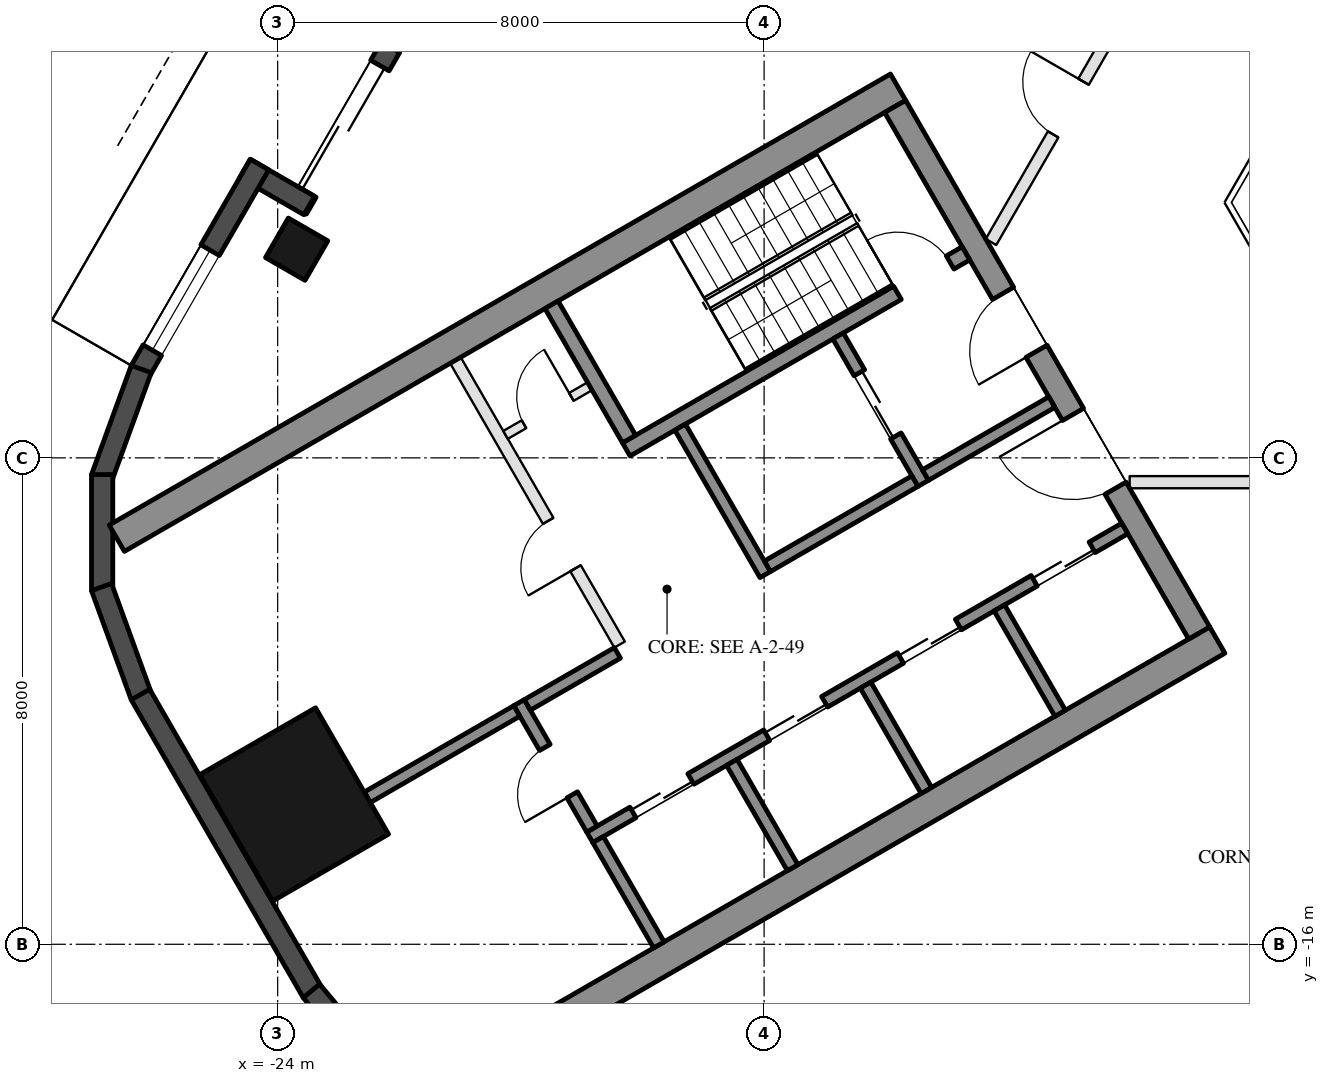
"""IFC4 building model, lengths in metres.
Left out: names, types, materials, properties, quantities, classifications, styles, units other than length and angle.
Written with IfcOpenShell. Run it as: python <this file> out.ifc"""

import sys

from ifc_helpers import new_model, si_unit, direction, frame, frame_2d, origin, origin_2d, place, context, subcontext, project, spatial, rectangle, hollow_rectangle, extrude, element, fill, save


model = new_model("IFC4")
c1 = context("Model", 3, precision=1e-05, world=origin(), true_north=direction((0.0, 1.0)))
c2 = subcontext(c1, "Body", "Model", "MODEL_VIEW")
j1 = project(units=[si_unit("LENGTHUNIT", "METRE"), si_unit("PLANEANGLEUNIT", "RADIAN")], contexts=[c1])
p1 = place(None, origin())
s1 = spatial("IfcSite", under=j1, at=p1, CompositionType="ELEMENT")
p2 = place(p1, origin())
s2 = spatial("IfcBuilding", under=s1, at=p2, CompositionType="ELEMENT")
p3 = place(p2, frame((0.0, 0.0, 213.2)))
s3 = spatial("IfcBuildingStorey", under=s2, at=p3, CompositionType="ELEMENT", Elevation=213.2)
p4 = place(p3, frame((-23.688, -4.568, 0.0), z_axis=(0.0, 0.0, 1.0), x_axis=(0.5, 0.866025403784, 0.0)))
e1 = element("IfcColumn", 1, at=p4, inside=s3, PredefinedType="COLUMN", context=c2, shape_type="SweptSolid", body=[
    extrude(hollow_rectangle(XDim=0.75, YDim=0.75, WallThickness=0.035, at=origin_2d()), origin(), (0.0, 0.0, 1.0), 3.7),
])
p5 = place(p3, frame((-23.729, -13.7, 0.0), z_axis=(0.0, 0.0, 1.0), x_axis=(-0.5, 0.866025403784, 0.0)))
e2 = element("IfcColumn", 2, at=p5, inside=s3, PredefinedType="COLUMN", context=c2, shape_type="SweptSolid", body=[
    extrude(hollow_rectangle(XDim=2.4, YDim=2.2, WallThickness=0.06, at=origin_2d()), origin(), (0.0, 0.0, 1.0), 3.7),
])
p6 = place(p3, frame((-20.309, 1.934, 0.0), z_axis=(0.0, 0.0, 1.0), x_axis=(-0.499992114976, -0.866029956157, 0.0)))
e3 = element("IfcWall", 3, at=p6, inside=s3, PredefinedType="SOLIDWALL", context=c2, shape_type="SweptSolid", body=[
    extrude(rectangle(XDim=6.74, YDim=0.35, at=frame_2d((3.37, 0.0))), origin(), (0.0, 0.0, 1.0), 3.55),
])
p7 = place(p6, frame((4.02, 0.0, 0.0)))
e4 = element("IfcOpeningElement", 4, at=p7, cuts=e3, PredefinedType="OPENING", context=c2, shape_type="SweptSolid", body=[
    extrude(rectangle(XDim=2.4, YDim=2.4, at=frame_2d((1.2, 1.2))), frame((0.0, 0.185, 0.0), z_axis=(0.0, -1.0, 0.0), x_axis=(1.0, 0.0, 0.0)), (0.0, 0.0, 1.0), 0.37),
])
p8 = place(p6, frame((0.77, 0.0, 0.3)))
e5 = element("IfcOpeningElement", 5, at=p8, cuts=e3, PredefinedType="OPENING", context=c2, shape_type="SweptSolid", body=[
    extrude(rectangle(XDim=2.9, YDim=2.65, at=frame_2d((1.45, 1.325))), frame((0.0, 0.185, 0.0), z_axis=(0.0, -1.0, 0.0), x_axis=(1.0, 0.0, 0.0)), (0.0, 0.0, 1.0), 0.37),
])
p9 = place(p3, frame((-23.481, -3.85, 0.0), z_axis=(0.0, 0.0, 1.0), x_axis=(-0.866092288191, 0.499884134912, 0.0)))
e6 = element("IfcWall", 6, at=p9, inside=s3, PredefinedType="SOLIDWALL", context=c2, shape_type="SweptSolid", body=[
    extrude(rectangle(XDim=1.22, YDim=0.35, at=frame_2d((0.61, 0.0))), origin(), (0.0, 0.0, 1.0), 3.55),
])
p10 = place(p3, frame((-24.299, -3.176, 0.0), z_axis=(0.0, 0.0, 1.0), x_axis=(-0.500028278809, -0.866009076391, 0.0)))
e7 = element("IfcWall", 7, at=p10, inside=s3, PredefinedType="SOLIDWALL", context=c2, shape_type="SweptSolid", body=[
    extrude(rectangle(XDim=3.916, YDim=0.35, at=frame_2d((1.958, 0.0))), origin(), (0.0, 0.0, 1.0), 3.55),
])
p11 = place(p10, frame((1.625, 0.0, 0.3)))
e8 = element("IfcOpeningElement", 8, at=p11, cuts=e7, PredefinedType="OPENING", context=c2, shape_type="SweptSolid", body=[
    extrude(rectangle(XDim=1.9, YDim=2.65, at=frame_2d((0.95, 1.325))), frame((0.0, 0.185, 0.0), z_axis=(0.0, -1.0, 0.0), x_axis=(1.0, 0.0, 0.0)), (0.0, 0.0, 1.0), 0.37),
])
for number, where, z_axis, x_axis in (
    (9, (-26.244, -6.54, 0.0), (0.0, 0.0, 1.0), (-0.342, -0.94, 0.0)),
    (10, (-26.886, -8.275, 0.0), (0.0, 0.0, 1.0), (0.0, -1.0, 0.0)),
    (11, (-26.897, -10.125, 0.0), (0.0, 0.0, 1.0), (0.342, -0.94, 0.0)),
):
    element("IfcWall", number, at=place(p3, frame(where, z_axis=z_axis, x_axis=x_axis)), inside=s3, PredefinedType="SOLIDWALL", context=c2, shape_type="SweptSolid", body=[
        extrude(rectangle(XDim=1.91, YDim=0.35, at=frame_2d((0.955, 0.0))), origin(), (0.0, 0.0, 1.0), 3.55),
    ])
p12 = place(p3, frame((-26.257, -11.893, 0.0), z_axis=(0.0, 0.0, 1.0), x_axis=(0.500018773155, -0.866014564827, 0.0)))
e12 = element("IfcWall", 12, at=p12, inside=s3, PredefinedType="SOLIDWALL", context=c2, shape_type="SweptSolid", body=[
    extrude(rectangle(XDim=5.658, YDim=0.35, at=frame_2d((2.829, 0.0))), origin(), (0.0, 0.0, 1.0), 3.55),
])
p13 = place(p3, frame((-23.445, -16.768, 0.0), z_axis=(0.0, 0.0, 1.0), x_axis=(0.642733291068, -0.76609001857, 0.0)))
e13 = element("IfcWall", 13, at=p13, inside=s3, PredefinedType="SOLIDWALL", context=c2, shape_type="SweptSolid", body=[
    extrude(rectangle(XDim=1.91, YDim=0.35, at=frame_2d((0.955, 0.0))), origin(), (0.0, 0.0, 1.0), 3.55),
])
for number, where, z_axis, x_axis in (
    (14, (-13.797, -1.903, 0.0), (0.0, 0.0, 1.0), (-0.866, -0.5, 0.0)),
    (15, (-8.547, -10.997, 0.0), (0.0, 0.0, 1.0), (-0.866, -0.5, 0.0)),
):
    element("IfcWall", number, at=place(p3, frame(where, z_axis=z_axis, x_axis=x_axis)), inside=s3, PredefinedType="SHEAR", context=c2, shape_type="SweptSolid", body=[
        extrude(rectangle(XDim=14.837, YDim=0.5, at=frame_2d((7.418, 0.0))), origin(), (0.0, 0.0, 1.0), 3.5),
    ])
p14 = place(p3, frame((-13.845, -2.22, 0.0), z_axis=(0.0, 0.0, 1.0), x_axis=(0.500004234368, -0.866022959057, 0.0)))
e16 = element("IfcWall", 16, at=p14, inside=s3, PredefinedType="SHEAR", context=c2, shape_type="SweptSolid", body=[
    extrude(rectangle(XDim=10.0, YDim=0.4, at=frame_2d((5.0, 0.0))), origin(), (0.0, 0.0, 1.0), 3.5),
])
p15 = place(p14, frame((3.55, 0.0, 0.0)))
e17 = element("IfcOpeningElement", 17, at=p15, cuts=e16, PredefinedType="OPENING", context=c2, shape_type="SweptSolid", body=[
    extrude(rectangle(XDim=1.1, YDim=2.1, at=frame_2d((0.55, 1.05))), frame((0.0, 0.21, 0.0), z_axis=(0.0, -1.0, 0.0), x_axis=(1.0, 0.0, 0.0)), (0.0, 0.0, 1.0), 0.42),
])
p16 = place(p14, frame((5.85, 0.0, 0.0)))
e18 = element("IfcOpeningElement", 18, at=p16, cuts=e16, PredefinedType="OPENING", context=c2, shape_type="SweptSolid", body=[
    extrude(rectangle(XDim=1.4, YDim=2.1, at=frame_2d((0.7, 1.05))), frame((0.0, 0.21, 0.0), z_axis=(0.0, -1.0, 0.0), x_axis=(1.0, 0.0, 0.0)), (0.0, 0.0, 1.0), 0.42),
])
p17 = place(p3, frame((-12.681, -4.636, 0.0), z_axis=(0.0, 0.0, 1.0), x_axis=(-0.866021702275, -0.500006411147, 0.0)))
e19 = element("IfcWall", 19, at=p17, inside=s3, PredefinedType="SHEAR", context=c2, shape_type="SweptSolid", body=[
    extrude(rectangle(XDim=6.45, YDim=0.25, at=frame_2d((3.225, 0.0))), origin(), (0.0, 0.0, 1.0), 3.5),
])
p18 = place(p17, frame((0.3, 0.0, 0.0)))
e20 = element("IfcOpeningElement", 20, at=p18, cuts=e19, PredefinedType="OPENING", context=c2, shape_type="SweptSolid", body=[
    extrude(rectangle(XDim=1.0, YDim=2.1, at=frame_2d((0.5, 1.05))), frame((0.0, 0.135, 0.0), z_axis=(0.0, -1.0, 0.0), x_axis=(1.0, 0.0, 0.0)), (0.0, 0.0, 1.0), 0.27),
])
p19 = place(p3, frame((-19.496, -5.482, 0.0), z_axis=(0.0, 0.0, 1.0), x_axis=(0.499990435942, -0.866030925526, 0.0)))
e21 = element("IfcWall", 21, at=p19, inside=s3, PredefinedType="SHEAR", context=c2, shape_type="SweptSolid", body=[
    extrude(rectangle(XDim=2.55, YDim=0.25, at=frame_2d((1.275, 0.0))), origin(), (0.0, 0.0, 1.0), 3.5),
])
p20 = place(p3, frame((-17.381, -7.495, 0.0), z_axis=(0.0, 0.0, 1.0), x_axis=(0.500011755427, -0.866018616679, 0.0)))
e22 = element("IfcWall", 22, at=p20, inside=s3, PredefinedType="SHEAR", context=c2, shape_type="SweptSolid", body=[
    extrude(rectangle(XDim=2.8, YDim=0.2, at=frame_2d((1.4, 0.0))), origin(), (0.0, 0.0, 1.0), 3.5),
])
p21 = place(p3, frame((-14.783, -5.995, 0.0), z_axis=(0.0, 0.0, 1.0), x_axis=(0.49994636267, -0.866056369097, 0.0)))
e23 = element("IfcWall", 23, at=p21, inside=s3, PredefinedType="SHEAR", context=c2, shape_type="SweptSolid", body=[
    extrude(rectangle(XDim=2.8, YDim=0.2, at=frame_2d((1.4, 0.0))), origin(), (0.0, 0.0, 1.0), 3.5),
])
p22 = place(p21, frame((0.7, 0.0, 0.0)))
e24 = element("IfcOpeningElement", 24, at=p22, cuts=e23, PredefinedType="OPENING", context=c2, shape_type="SweptSolid", body=[
    extrude(rectangle(XDim=1.2, YDim=2.1, at=frame_2d((0.6, 1.05))), frame((0.0, 0.11, 0.0), z_axis=(0.0, -1.0, 0.0), x_axis=(1.0, 0.0, 0.0)), (0.0, 0.0, 1.0), 0.22),
])
p23 = place(p3, frame((-13.52, -8.383, 0.0), z_axis=(0.0, 0.0, 1.0), x_axis=(-0.866034573852, -0.49998411664, 0.0)))
e25 = element("IfcWall", 25, at=p23, inside=s3, PredefinedType="SHEAR", context=c2, shape_type="SweptSolid", body=[
    extrude(rectangle(XDim=2.8, YDim=0.2, at=frame_2d((1.4, 0.0))), origin(), (0.0, 0.0, 1.0), 3.5),
])
p24 = place(p3, frame((-11.268, -7.083, 0.0), z_axis=(0.0, 0.0, 1.0), x_axis=(-0.866050077142, -0.499957262057, 0.0)))
e26 = element("IfcWall", 26, at=p24, inside=s3, PredefinedType="SHEAR", context=c2, shape_type="SweptSolid", body=[
    extrude(rectangle(XDim=2.4, YDim=0.2, at=frame_2d((1.2, 0.0))), origin(), (0.0, 0.0, 1.0), 3.5),
])
p25 = place(p3, frame((-10.068, -9.162, 0.0), z_axis=(0.0, 0.0, 1.0), x_axis=(-0.866032725843, -0.499987317609, 0.0)))
e27 = element("IfcWall", 27, at=p25, inside=s3, PredefinedType="SHEAR", context=c2, shape_type="SweptSolid", body=[
    extrude(rectangle(XDim=10.16, YDim=0.2, at=frame_2d((5.08, 0.0))), origin(), (0.0, 0.0, 1.0), 3.5),
])
p26 = place(p25, frame((0.62, 0.0, 0.0)))
e28 = element("IfcOpeningElement", 28, at=p26, cuts=e27, PredefinedType="OPENING", context=c2, shape_type="SweptSolid", body=[
    extrude(rectangle(XDim=1.1, YDim=2.1, at=frame_2d((0.55, 1.05))), frame((0.0, 0.11, 0.0), z_axis=(0.0, -1.0, 0.0), x_axis=(1.0, 0.0, 0.0)), (0.0, 0.0, 1.0), 0.22),
])
p27 = place(p25, frame((3.16, 0.0, 0.0)))
e29 = element("IfcOpeningElement", 29, at=p27, cuts=e27, PredefinedType="OPENING", context=c2, shape_type="SweptSolid", body=[
    extrude(rectangle(XDim=1.1, YDim=2.1, at=frame_2d((0.55, 1.05))), frame((0.0, 0.11, 0.0), z_axis=(0.0, -1.0, 0.0), x_axis=(1.0, 0.0, 0.0)), (0.0, 0.0, 1.0), 0.22),
])
p28 = place(p25, frame((5.7, 0.0, 0.0)))
e30 = element("IfcOpeningElement", 30, at=p28, cuts=e27, PredefinedType="OPENING", context=c2, shape_type="SweptSolid", body=[
    extrude(rectangle(XDim=1.1, YDim=2.1, at=frame_2d((0.55, 1.05))), frame((0.0, 0.11, 0.0), z_axis=(0.0, -1.0, 0.0), x_axis=(1.0, 0.0, 0.0)), (0.0, 0.0, 1.0), 0.22),
])
p29 = place(p25, frame((8.24, 0.0, 0.0)))
e31 = element("IfcOpeningElement", 31, at=p29, cuts=e27, PredefinedType="OPENING", context=c2, shape_type="SweptSolid", body=[
    extrude(rectangle(XDim=1.1, YDim=2.1, at=frame_2d((0.55, 1.05))), frame((0.0, 0.11, 0.0), z_axis=(0.0, -1.0, 0.0), x_axis=(1.0, 0.0, 0.0)), (0.0, 0.0, 1.0), 0.22),
])
p30 = place(p3, frame((-20.031, -12.026, 0.0), z_axis=(0.0, 0.0, 1.0), x_axis=(0.500033551112, -0.866006032174, 0.0)))
e32 = element("IfcWall", 32, at=p30, inside=s3, PredefinedType="SHEAR", context=c2, shape_type="SweptSolid", body=[
    extrude(rectangle(XDim=2.4, YDim=0.2, at=frame_2d((1.2, 0.0))), origin(), (0.0, 0.0, 1.0), 3.5),
])
p31 = place(p30, frame((0.85, 0.0, 0.0)))
e33 = element("IfcOpeningElement", 33, at=p31, cuts=e32, PredefinedType="OPENING", context=c2, shape_type="SweptSolid", body=[
    extrude(rectangle(XDim=0.9, YDim=2.1, at=frame_2d((0.45, 1.05))), frame((0.0, 0.11, 0.0), z_axis=(0.0, -1.0, 0.0), x_axis=(1.0, 0.0, 0.0)), (0.0, 0.0, 1.0), 0.22),
])
p32 = place(p3, frame((-18.413, -11.208, 0.0), z_axis=(0.0, 0.0, 1.0), x_axis=(-0.866038183914, -0.499977863513, 0.0)))
e34 = element("IfcWall", 34, at=p32, inside=s3, PredefinedType="SHEAR", context=c2, shape_type="SweptSolid", body=[
    extrude(rectangle(XDim=1.71, YDim=0.2, at=frame_2d((0.855, 0.0))), origin(), (0.0, 0.0, 1.0), 3.5),
])
for number, where, z_axis, x_axis in (
    (35, (-12.131, -10.468, 0.0), (0.0, 0.0, 1.0), (0.5, -0.866, 0.0)),
    (36, (-14.331, -11.738, 0.0), (0.0, 0.0, 1.0), (0.5, -0.866, 0.0)),
    (37, (-16.531, -13.008, 0.0), (0.0, 0.0, 1.0), (0.5, -0.866, 0.0)),
    (38, (-18.73, -14.278, 0.0), (0.0, 0.0, 1.0), (0.5, -0.866, 0.0)),
):
    element("IfcWall", number, at=place(p3, frame(where, z_axis=z_axis, x_axis=x_axis)), inside=s3, PredefinedType="SHEAR", context=c2, shape_type="SweptSolid", body=[
        extrude(rectangle(XDim=2.0, YDim=0.2, at=frame_2d((1.0, 0.0))), origin(), (0.0, 0.0, 1.0), 3.5),
    ])
p33 = place(p3, frame((-20.067, -12.163, 0.0), z_axis=(0.0, 0.0, 1.0), x_axis=(-0.866055327414, -0.49994816717, 0.0)))
e39 = element("IfcWall", 39, at=p33, inside=s3, PredefinedType="SHEAR", context=c2, shape_type="SweptSolid", body=[
    extrude(rectangle(XDim=2.84, YDim=0.2, at=frame_2d((1.42, 0.0))), origin(), (0.0, 0.0, 1.0), 3.5),
])
p34 = place(p3, frame((-21.076, -6.395, 0.0), z_axis=(0.0, 0.0, 1.0), x_axis=(0.50001468107, -0.866016927499, 0.0)))
e40 = element("IfcWall", 40, at=p34, inside=s3, PredefinedType="PARTITIONING", context=c2, shape_type="SweptSolid", body=[
    extrude(rectangle(XDim=5.4, YDim=0.2, at=frame_2d((2.7, 0.0))), origin(), (0.0, 0.0, 1.0), 3.5),
])
p35 = place(p34, frame((3.05, 0.0, 0.0)))
e41 = element("IfcOpeningElement", 41, at=p35, cuts=e40, PredefinedType="OPENING", context=c2, shape_type="SweptSolid", body=[
    extrude(rectangle(XDim=0.9, YDim=2.1, at=frame_2d((0.45, 1.05))), frame((0.0, 0.11, 0.0), z_axis=(0.0, -1.0, 0.0), x_axis=(1.0, 0.0, 0.0)), (0.0, 0.0, 1.0), 0.22),
])
p36 = place(p3, frame((-18.866, -6.822, 0.0), z_axis=(0.0, 0.0, 1.0), x_axis=(-0.866028054938, -0.499995408039, 0.0)))
e42 = element("IfcWall", 42, at=p36, inside=s3, PredefinedType="PARTITIONING", context=c2, shape_type="SweptSolid", body=[
    extrude(rectangle(XDim=1.6, YDim=0.15, at=frame_2d((0.8, 0.0))), origin(), (0.0, 0.0, 1.0), 3.5),
])
p37 = place(p36, frame((0.35, 0.0, 0.0)))
e43 = element("IfcOpeningElement", 43, at=p37, cuts=e42, PredefinedType="OPENING", context=c2, shape_type="SweptSolid", body=[
    extrude(rectangle(XDim=0.9, YDim=2.1, at=frame_2d((0.45, 1.05))), frame((0.0, 0.085, 0.0), z_axis=(0.0, -1.0, 0.0), x_axis=(1.0, 0.0, 0.0)), (0.0, 0.0, 1.0), 0.17),
])
p38 = place(p3, frame((-2.4, -8.4, 0.0), z_axis=(0.0, 0.0, 1.0), x_axis=(-1.0, 0.0, 0.0)))
e44 = element("IfcWall", 44, at=p38, inside=s3, PredefinedType="PARTITIONING", context=c2, shape_type="SweptSolid", body=[
    extrude(rectangle(XDim=7.588, YDim=0.2, at=frame_2d((3.794, 0.0))), origin(), (0.0, 0.0, 1.0), 2.95),
])
p39 = place(p38, frame((3.294, 0.0, 0.0)))
e45 = element("IfcOpeningElement", 45, at=p39, cuts=e44, PredefinedType="OPENING", context=c2, shape_type="SweptSolid", body=[
    extrude(rectangle(XDim=1.0, YDim=2.1, at=frame_2d((0.5, 1.05))), frame((0.0, 0.11, 0.0), z_axis=(0.0, -1.0, 0.0), x_axis=(1.0, 0.0, 0.0)), (0.0, 0.0, 1.0), 0.22),
])
p40 = place(p3, frame((-12.269, -4.45, 0.0), z_axis=(0.0, 0.0, 1.0), x_axis=(0.500014573982, 0.866016989329, 0.0)))
e46 = element("IfcWall", 46, at=p40, inside=s3, PredefinedType="PARTITIONING", context=c2, shape_type="SweptSolid", body=[
    extrude(rectangle(XDim=5.088, YDim=0.2, at=frame_2d((2.544, 0.0))), origin(), (0.0, 0.0, 1.0), 2.95),
])
p41 = place(p40, frame((2.044, 0.0, 0.0)))
e47 = element("IfcOpeningElement", 47, at=p41, cuts=e46, PredefinedType="OPENING", context=c2, shape_type="SweptSolid", body=[
    extrude(rectangle(XDim=1.0, YDim=2.1, at=frame_2d((0.5, 1.05))), frame((0.0, 0.11, 0.0), z_axis=(0.0, -1.0, 0.0), x_axis=(1.0, 0.0, 0.0)), (0.0, 0.0, 1.0), 0.22),
])
p42 = place(p7, frame((2.4, 0.0, 0.0), z_axis=(0.0, 0.0, 1.0), x_axis=(-1.0, 0.0, 0.0)))
e48 = element("IfcDoor", 48, at=p42, inside=s3, OperationType="SLIDING_TO_LEFT", PredefinedType="DOOR", context=c2, shape_type="SweptSolid", body=[
    extrude(rectangle(XDim=2.4, YDim=2.4, at=frame_2d((1.2, 1.2))), frame((0.0, 0.025, 0.0), z_axis=(0.0, -1.0, 0.0), x_axis=(1.0, 0.0, 0.0)), (0.0, 0.0, 1.0), 0.05),
])
fill(e4, e48)
p43 = place(p11, origin())
e49 = element("IfcWindow", 49, at=p43, inside=s3, PartitioningType="SINGLE_PANEL", PredefinedType="WINDOW", context=c2, shape_type="SweptSolid", body=[
    extrude(rectangle(XDim=1.9, YDim=2.65, at=frame_2d((0.95, 1.325))), frame((0.0, 0.03, 0.0), z_axis=(0.0, -1.0, 0.0), x_axis=(1.0, 0.0, 0.0)), (0.0, 0.0, 1.0), 0.06),
])
fill(e8, e49)
p44 = place(p22, origin())
e50 = element("IfcDoor", 50, at=p44, inside=s3, OperationType="DOUBLE_DOOR_SLIDING", PredefinedType="DOOR", context=c2, shape_type="SweptSolid", body=[
    extrude(rectangle(XDim=1.2, YDim=2.1, at=frame_2d((0.6, 1.05))), frame((0.0, 0.025, 0.0), z_axis=(0.0, -1.0, 0.0), x_axis=(1.0, 0.0, 0.0)), (0.0, 0.0, 1.0), 0.05),
])
fill(e24, e50)
p45 = place(p37, frame((0.9, 0.0, 0.0), z_axis=(0.0, 0.0, 1.0), x_axis=(-1.0, 0.0, 0.0)))
e51 = element("IfcDoor", 51, at=p45, inside=s3, OperationType="SINGLE_SWING_RIGHT", PredefinedType="DOOR", context=c2, shape_type="SweptSolid", body=[
    extrude(rectangle(XDim=0.9, YDim=2.1, at=frame_2d((0.45, 1.05))), frame((0.0, 0.025, 0.0), z_axis=(0.0, -1.0, 0.0), x_axis=(1.0, 0.0, 0.0)), (0.0, 0.0, 1.0), 0.05),
])
fill(e43, e51)
p46 = place(p26, origin())
e52 = element("IfcDoor", 52, at=p46, inside=s3, OperationType="DOUBLE_DOOR_SLIDING", PredefinedType="DOOR", context=c2, shape_type="SweptSolid", body=[
    extrude(rectangle(XDim=1.1, YDim=2.1, at=frame_2d((0.55, 1.05))), frame((0.0, 0.025, 0.0), z_axis=(0.0, -1.0, 0.0), x_axis=(1.0, 0.0, 0.0)), (0.0, 0.0, 1.0), 0.05),
])
fill(e28, e52)
p47 = place(p27, origin())
e53 = element("IfcDoor", 53, at=p47, inside=s3, OperationType="DOUBLE_DOOR_SLIDING", PredefinedType="DOOR", context=c2, shape_type="SweptSolid", body=[
    extrude(rectangle(XDim=1.1, YDim=2.1, at=frame_2d((0.55, 1.05))), frame((0.0, 0.025, 0.0), z_axis=(0.0, -1.0, 0.0), x_axis=(1.0, 0.0, 0.0)), (0.0, 0.0, 1.0), 0.05),
])
fill(e29, e53)
p48 = place(p28, origin())
e54 = element("IfcDoor", 54, at=p48, inside=s3, OperationType="DOUBLE_DOOR_SLIDING", PredefinedType="DOOR", context=c2, shape_type="SweptSolid", body=[
    extrude(rectangle(XDim=1.1, YDim=2.1, at=frame_2d((0.55, 1.05))), frame((0.0, 0.025, 0.0), z_axis=(0.0, -1.0, 0.0), x_axis=(1.0, 0.0, 0.0)), (0.0, 0.0, 1.0), 0.05),
])
fill(e30, e54)
p49 = place(p29, origin())
e55 = element("IfcDoor", 55, at=p49, inside=s3, OperationType="DOUBLE_DOOR_SLIDING", PredefinedType="DOOR", context=c2, shape_type="SweptSolid", body=[
    extrude(rectangle(XDim=1.1, YDim=2.1, at=frame_2d((0.55, 1.05))), frame((0.0, 0.025, 0.0), z_axis=(0.0, -1.0, 0.0), x_axis=(1.0, 0.0, 0.0)), (0.0, 0.0, 1.0), 0.05),
])
fill(e31, e55)
p50 = place(p31, frame((0.9, 0.0, 0.0), z_axis=(0.0, 0.0, 1.0), x_axis=(-1.0, 0.0, 0.0)))
e56 = element("IfcDoor", 56, at=p50, inside=s3, OperationType="SINGLE_SWING_LEFT", PredefinedType="DOOR", context=c2, shape_type="SweptSolid", body=[
    extrude(rectangle(XDim=0.9, YDim=2.1, at=frame_2d((0.45, 1.05))), frame((0.0, 0.025, 0.0), z_axis=(0.0, -1.0, 0.0), x_axis=(1.0, 0.0, 0.0)), (0.0, 0.0, 1.0), 0.05),
])
fill(e33, e56)
p51 = place(p35, frame((0.9, 0.0, 0.0), z_axis=(0.0, 0.0, 1.0), x_axis=(-1.0, 0.0, 0.0)))
e57 = element("IfcDoor", 57, at=p51, inside=s3, OperationType="SINGLE_SWING_LEFT", PredefinedType="DOOR", context=c2, shape_type="SweptSolid", body=[
    extrude(rectangle(XDim=0.9, YDim=2.1, at=frame_2d((0.45, 1.05))), frame((0.0, 0.025, 0.0), z_axis=(0.0, -1.0, 0.0), x_axis=(1.0, 0.0, 0.0)), (0.0, 0.0, 1.0), 0.05),
])
fill(e41, e57)
p52 = place(p15, frame((1.1, 0.0, 0.0), z_axis=(0.0, 0.0, 1.0), x_axis=(-1.0, 0.0, 0.0)))
e58 = element("IfcDoor", 58, at=p52, inside=s3, OperationType="SINGLE_SWING_LEFT", PredefinedType="DOOR", context=c2, shape_type="SweptSolid", body=[
    extrude(rectangle(XDim=1.1, YDim=2.1, at=frame_2d((0.55, 1.05))), frame((0.0, 0.025, 0.0), z_axis=(0.0, -1.0, 0.0), x_axis=(1.0, 0.0, 0.0)), (0.0, 0.0, 1.0), 0.05),
])
fill(e17, e58)
p53 = place(p16, frame((1.4, 0.0, 0.0), z_axis=(0.0, 0.0, 1.0), x_axis=(-1.0, 0.0, 0.0)))
e59 = element("IfcDoor", 59, at=p53, inside=s3, OperationType="DOUBLE_DOOR_SINGLE_SWING", PredefinedType="DOOR", context=c2, shape_type="SweptSolid", body=[
    extrude(rectangle(XDim=1.4, YDim=2.1, at=frame_2d((0.7, 1.05))), frame((0.0, 0.025, 0.0), z_axis=(0.0, -1.0, 0.0), x_axis=(1.0, 0.0, 0.0)), (0.0, 0.0, 1.0), 0.05),
])
fill(e18, e59)
p54 = place(p18, frame((1.0, 0.0, 0.0), z_axis=(0.0, 0.0, 1.0), x_axis=(-1.0, 0.0, 0.0)))
e60 = element("IfcDoor", 60, at=p54, inside=s3, OperationType="SINGLE_SWING_LEFT", PredefinedType="DOOR", context=c2, shape_type="SweptSolid", body=[
    extrude(rectangle(XDim=1.0, YDim=2.1, at=frame_2d((0.5, 1.05))), frame((0.0, 0.025, 0.0), z_axis=(0.0, -1.0, 0.0), x_axis=(1.0, 0.0, 0.0)), (0.0, 0.0, 1.0), 0.05),
])
fill(e20, e60)
p55 = place(p41, origin())
e61 = element("IfcDoor", 61, at=p55, inside=s3, OperationType="SINGLE_SWING_RIGHT", PredefinedType="DOOR", context=c2, shape_type="SweptSolid", body=[
    extrude(rectangle(XDim=1.0, YDim=2.1, at=frame_2d((0.5, 1.05))), frame((0.0, 0.025, 0.0), z_axis=(0.0, -1.0, 0.0), x_axis=(1.0, 0.0, 0.0)), (0.0, 0.0, 1.0), 0.05),
])
fill(e47, e61)
save(model, sys.argv[1])
